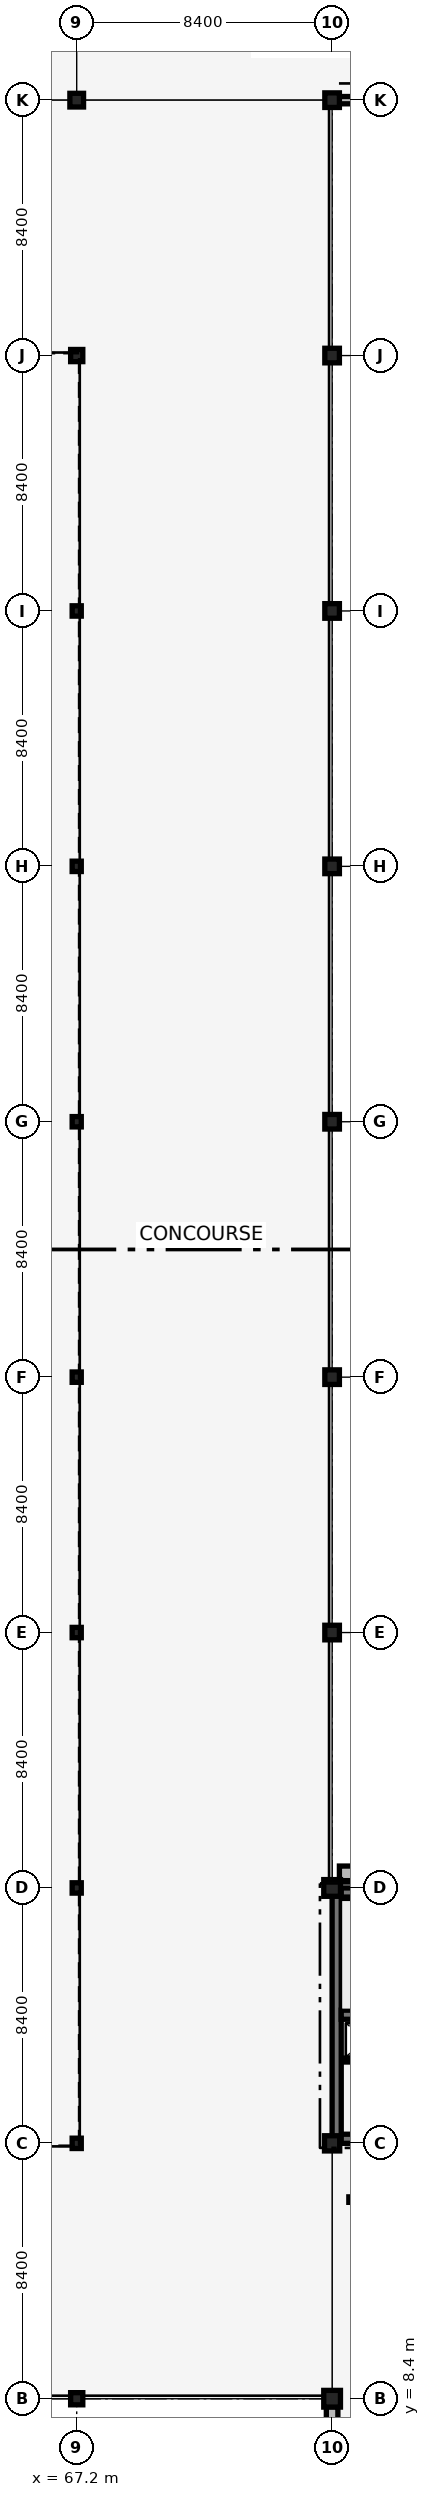
"""IFC4 building model, lengths in metres.
Left out: names, types, materials, properties, quantities, classifications, styles, units other than length and angle.
Written with IfcOpenShell. Run it as: python <this file> out.ifc"""

import sys

from ifc_helpers import new_model, si_unit, direction, frame, frame_2d, origin, origin_2d, place, context, subcontext, project, spatial, rectangle, i_section, extrude, element, save


model = new_model("IFC4")
c1 = context("Model", 3, precision=1e-05, world=origin(), true_north=direction((0.0, 1.0)))
c2 = subcontext(c1, "Body", "Model", "MODEL_VIEW")
j1 = project(units=[si_unit("LENGTHUNIT", "METRE"), si_unit("PLANEANGLEUNIT", "RADIAN")], contexts=[c1])
p1 = place(None, origin())
s1 = spatial("IfcSite", under=j1, at=p1, CompositionType="ELEMENT")
p2 = place(p1, origin())
s2 = spatial("IfcBuilding", under=s1, at=p2, CompositionType="ELEMENT")
p3 = place(p2, frame((0.0, 0.0, 5.44)))
s3 = spatial("IfcBuildingStorey", under=s2, at=p3, CompositionType="ELEMENT", Elevation=5.44)
p4 = place(p3, frame((75.75, 16.95, 0.0), z_axis=(0.0, 0.0, 1.0), x_axis=(1.0, 0.0, 0.0)))
e1 = element("IfcWall", 1, at=p4, inside=s3, PredefinedType="SHEAR", context=c2, shape_type="SweptSolid", body=[
    extrude(rectangle(XDim=8.1, YDim=0.3, at=frame_2d((4.05, 0.0))), origin(), (0.0, 0.0, 1.0), 4.12),
])
p5 = place(p4, frame((0.485, 0.0, 0.0)))
e2 = element("IfcOpeningElement", 2, at=p5, cuts=e1, PredefinedType="OPENING", context=c2, shape_type="SweptSolid", body=[
    extrude(rectangle(XDim=1.0, YDim=2.15, at=frame_2d((0.5, 1.075))), frame((0.0, 0.16, 0.0), z_axis=(0.0, -1.0, 0.0), x_axis=(1.0, 0.0, 0.0)), (0.0, 0.0, 1.0), 0.32),
])
for number, where, z_axis, x_axis in (
    (3, (75.75, 25.05, 0.0), (0.0, 0.0, 1.0), (1.0, 0.0, 0.0)),
    (4, (75.75, 16.95, 0.0), (0.0, 0.0, 1.0), (0.0, 1.0, 0.0)),
):
    element("IfcWall", number, at=place(p3, frame(where, z_axis=z_axis, x_axis=x_axis)), inside=s3, PredefinedType="SHEAR", context=c2, shape_type="SweptSolid", body=[
        extrude(rectangle(XDim=8.1, YDim=0.3, at=frame_2d((4.05, 0.0))), origin(), (0.0, 0.0, 1.0), 4.12),
    ])
p6 = place(p3, frame((75.9, 21.03, 0.0), z_axis=(0.0, 0.0, 1.0), x_axis=(1.0, 0.0, 0.0)))
e5 = element("IfcWall", 5, at=p6, inside=s3, PredefinedType="SHEAR", context=c2, shape_type="SweptSolid", body=[
    extrude(rectangle(XDim=7.8, YDim=0.3, at=frame_2d((3.9, 0.0))), origin(), (0.0, 0.0, 1.0), 4.12),
])
p7 = place(p6, frame((6.2, 0.0, 0.0)))
e6 = element("IfcOpeningElement", 6, at=p7, cuts=e5, PredefinedType="OPENING", context=c2, shape_type="SweptSolid", body=[
    extrude(rectangle(XDim=1.35, YDim=2.15, at=frame_2d((0.675, 1.075))), frame((0.0, 0.16, 0.0), z_axis=(0.0, -1.0, 0.0), x_axis=(1.0, 0.0, 0.0)), (0.0, 0.0, 1.0), 0.32),
])
p8 = place(p3, frame((67.2, 8.4, 0.0), z_axis=(0.0, 0.0, 1.0), x_axis=(1.0, 0.0, 0.0)))
e7 = element("IfcColumn", 7, at=p8, inside=s3, PredefinedType="COLUMN", context=c2, shape_type="SweptSolid", body=[
    extrude(rectangle(XDim=0.4, YDim=0.4, at=origin_2d()), origin(), (0.0, 0.0, 1.0), 4.12),
])
for number, where, z_axis, x_axis in (
    (8, (67.2, 16.8, 0.0), (0.0, 0.0, 1.0), (1.0, 0.0, 0.0)),
    (9, (67.2, 25.2, 0.0), (0.0, 0.0, 1.0), (1.0, 0.0, 0.0)),
    (10, (67.2, 33.6, 0.0), (0.0, 0.0, 1.0), (1.0, 0.0, 0.0)),
    (11, (67.2, 42.0, 0.0), (0.0, 0.0, 1.0), (1.0, 0.0, 0.0)),
    (12, (67.2, 50.4, 0.0), (0.0, 0.0, 1.0), (1.0, 0.0, 0.0)),
    (13, (67.2, 58.8, 0.0), (0.0, 0.0, 1.0), (1.0, 0.0, 0.0)),
    (14, (67.2, 67.2, 0.0), (0.0, 0.0, 1.0), (1.0, 0.0, 0.0)),
):
    element("IfcColumn", number, at=place(p3, frame(where, z_axis=z_axis, x_axis=x_axis)), inside=s3, PredefinedType="COLUMN", context=c2, shape_type="SweptSolid", body=[
        extrude(i_section(OverallWidth=0.3, OverallDepth=0.34, WebThickness=0.012, FlangeThickness=0.021, FilletRadius=0.027, at=origin_2d()), origin(), (0.0, 0.0, 1.0), 4.12),
    ])
p9 = place(p3, frame((67.2, 75.6, 0.0), z_axis=(0.0, 0.0, 1.0), x_axis=(1.0, 0.0, 0.0)))
e15 = element("IfcColumn", 15, at=p9, inside=s3, PredefinedType="COLUMN", context=c2, shape_type="SweptSolid", body=[
    extrude(rectangle(XDim=0.4, YDim=0.4, at=origin_2d()), origin(), (0.0, 0.0, 1.0), 4.12),
])
p10 = place(p3, frame((67.2, 84.0, 0.0), z_axis=(0.0, 0.0, 1.0), x_axis=(1.0, 0.0, 0.0)))
e16 = element("IfcColumn", 16, at=p10, inside=s3, PredefinedType="COLUMN", context=c2, shape_type="SweptSolid", body=[
    extrude(rectangle(XDim=0.45, YDim=0.45, at=origin_2d()), origin(), (0.0, 0.0, 1.0), 4.12),
])
p11 = place(p3, frame((75.6, 8.4, 0.0), z_axis=(0.0, 0.0, 1.0), x_axis=(1.0, 0.0, 0.0)))
e17 = element("IfcColumn", 17, at=p11, inside=s3, PredefinedType="COLUMN", context=c2, shape_type="SweptSolid", body=[
    extrude(rectangle(XDim=0.55, YDim=0.55, at=origin_2d()), origin(), (0.0, 0.0, 1.0), 4.12),
])
p12 = place(p3, frame((75.6, 16.8, 0.0), z_axis=(0.0, 0.0, 1.0), x_axis=(1.0, 0.0, 0.0)))
e18 = element("IfcColumn", 18, at=p12, inside=s3, PredefinedType="COLUMN", context=c2, shape_type="SweptSolid", body=[
    extrude(rectangle(XDim=0.5, YDim=0.5, at=origin_2d()), origin(), (0.0, 0.0, 1.0), 4.12),
])
p13 = place(p3, frame((75.6, 25.2, 0.0), z_axis=(0.0, 0.0, 1.0), x_axis=(1.0, 0.0, 0.0)))
e19 = element("IfcColumn", 19, at=p13, inside=s3, PredefinedType="COLUMN", context=c2, shape_type="SweptSolid", body=[
    extrude(rectangle(XDim=0.55, YDim=0.55, at=origin_2d()), origin(), (0.0, 0.0, 1.0), 4.12),
])
for number, where, z_axis, x_axis in (
    (20, (75.6, 33.6, 0.0), (0.0, 0.0, 1.0), (1.0, 0.0, 0.0)),
    (21, (75.6, 42.0, 0.0), (0.0, 0.0, 1.0), (1.0, 0.0, 0.0)),
    (22, (75.6, 50.4, 0.0), (0.0, 0.0, 1.0), (1.0, 0.0, 0.0)),
    (23, (75.6, 58.8, 0.0), (0.0, 0.0, 1.0), (1.0, 0.0, 0.0)),
    (24, (75.6, 67.2, 0.0), (0.0, 0.0, 1.0), (1.0, 0.0, 0.0)),
    (25, (75.6, 75.6, 0.0), (0.0, 0.0, 1.0), (1.0, 0.0, 0.0)),
    (26, (75.6, 84.0, 0.0), (0.0, 0.0, 1.0), (1.0, 0.0, 0.0)),
):
    element("IfcColumn", number, at=place(p3, frame(where, z_axis=z_axis, x_axis=x_axis)), inside=s3, PredefinedType="COLUMN", context=c2, shape_type="SweptSolid", body=[
        extrude(rectangle(XDim=0.48, YDim=0.48, at=origin_2d()), origin(), (0.0, 0.0, 1.0), 4.12),
    ])
p14 = place(p3, frame((75.6, 0.235, 0.0), z_axis=(0.0, 0.0, 1.0), x_axis=(0.0, 1.0, 0.0)))
e27 = element("IfcWall", 27, at=p14, inside=s3, PredefinedType="SOLIDWALL", context=c2, shape_type="SweptSolid", body=[
    extrude(rectangle(XDim=7.905, YDim=0.38, at=frame_2d((3.952, 0.0))), origin(), (0.0, 0.0, 1.0), 3.81),
])
p15 = place(p14, frame((1.162, 0.0, 0.75)))
e28 = element("IfcOpeningElement", 28, at=p15, cuts=e27, PredefinedType="OPENING", context=c2, shape_type="SweptSolid", body=[
    extrude(rectangle(XDim=0.68, YDim=2.3, at=frame_2d((0.34, 1.15))), frame((0.0, 0.2, 0.0), z_axis=(0.0, -1.0, 0.0), x_axis=(1.0, 0.0, 0.0)), (0.0, 0.0, 1.0), 0.4),
])
p16 = place(p14, frame((2.743, 0.0, 0.75)))
e29 = element("IfcOpeningElement", 29, at=p16, cuts=e27, PredefinedType="OPENING", context=c2, shape_type="SweptSolid", body=[
    extrude(rectangle(XDim=0.68, YDim=2.3, at=frame_2d((0.34, 1.15))), frame((0.0, 0.2, 0.0), z_axis=(0.0, -1.0, 0.0), x_axis=(1.0, 0.0, 0.0)), (0.0, 0.0, 1.0), 0.4),
])
p17 = place(p14, frame((4.482, 0.0, 0.75)))
e30 = element("IfcOpeningElement", 30, at=p17, cuts=e27, PredefinedType="OPENING", context=c2, shape_type="SweptSolid", body=[
    extrude(rectangle(XDim=0.68, YDim=2.3, at=frame_2d((0.34, 1.15))), frame((0.0, 0.2, 0.0), z_axis=(0.0, -1.0, 0.0), x_axis=(1.0, 0.0, 0.0)), (0.0, 0.0, 1.0), 0.4),
])
p18 = place(p14, frame((6.063, 0.0, 0.75)))
e31 = element("IfcOpeningElement", 31, at=p18, cuts=e27, PredefinedType="OPENING", context=c2, shape_type="SweptSolid", body=[
    extrude(rectangle(XDim=0.68, YDim=2.3, at=frame_2d((0.34, 1.15))), frame((0.0, 0.2, 0.0), z_axis=(0.0, -1.0, 0.0), x_axis=(1.0, 0.0, 0.0)), (0.0, 0.0, 1.0), 0.4),
])
p19 = place(p3, frame((75.84, 25.68, 0.0), z_axis=(0.0, 0.0, 1.0), x_axis=(1.0, 0.0, 0.0)))
e32 = element("IfcWall", 32, at=p19, inside=s3, PredefinedType="SOLIDWALL", context=c2, shape_type="SweptSolid", body=[
    extrude(rectangle(XDim=7.92, YDim=0.48, at=frame_2d((3.96, 0.0))), origin(), (0.0, 0.0, 1.0), 4.42),
])
p20 = place(p3, frame((75.825, 84.0, 0.0), z_axis=(0.0, 0.0, 1.0), x_axis=(1.0, 0.0, 0.0)))
e33 = element("IfcWall", 33, at=p20, inside=s3, PredefinedType="SOLIDWALL", context=c2, shape_type="SweptSolid", body=[
    extrude(rectangle(XDim=7.965, YDim=0.24, at=frame_2d((3.982, 0.0))), origin(), (0.0, 0.0, 1.0), 3.38),
])
p21 = place(p20, frame((0.816, 0.0, 0.35)))
e34 = element("IfcOpeningElement", 34, at=p21, cuts=e33, PredefinedType="OPENING", context=c2, shape_type="SweptSolid", body=[
    extrude(rectangle(XDim=0.44, YDim=1.25, at=frame_2d((0.22, 0.625))), frame((0.0, 0.13, 0.0), z_axis=(0.0, -1.0, 0.0), x_axis=(1.0, 0.0, 0.0)), (0.0, 0.0, 1.0), 0.26),
])
p22 = place(p20, frame((2.29, 0.0, 0.35)))
e35 = element("IfcOpeningElement", 35, at=p22, cuts=e33, PredefinedType="OPENING", context=c2, shape_type="SweptSolid", body=[
    extrude(rectangle(XDim=0.44, YDim=1.25, at=frame_2d((0.22, 0.625))), frame((0.0, 0.13, 0.0), z_axis=(0.0, -1.0, 0.0), x_axis=(1.0, 0.0, 0.0)), (0.0, 0.0, 1.0), 0.26),
])
p23 = place(p20, frame((3.762, 0.0, 0.35)))
e36 = element("IfcOpeningElement", 36, at=p23, cuts=e33, PredefinedType="OPENING", context=c2, shape_type="SweptSolid", body=[
    extrude(rectangle(XDim=0.44, YDim=1.25, at=frame_2d((0.22, 0.625))), frame((0.0, 0.13, 0.0), z_axis=(0.0, -1.0, 0.0), x_axis=(1.0, 0.0, 0.0)), (0.0, 0.0, 1.0), 0.26),
])
p24 = place(p20, frame((5.236, 0.0, 0.35)))
e37 = element("IfcOpeningElement", 37, at=p24, cuts=e33, PredefinedType="OPENING", context=c2, shape_type="SweptSolid", body=[
    extrude(rectangle(XDim=0.44, YDim=1.25, at=frame_2d((0.22, 0.625))), frame((0.0, 0.13, 0.0), z_axis=(0.0, -1.0, 0.0), x_axis=(1.0, 0.0, 0.0)), (0.0, 0.0, 1.0), 0.26),
])
p25 = place(p20, frame((6.708, 0.0, 0.35)))
e38 = element("IfcOpeningElement", 38, at=p25, cuts=e33, PredefinedType="OPENING", context=c2, shape_type="SweptSolid", body=[
    extrude(rectangle(XDim=0.44, YDim=1.25, at=frame_2d((0.22, 0.625))), frame((0.0, 0.13, 0.0), z_axis=(0.0, -1.0, 0.0), x_axis=(1.0, 0.0, 0.0)), (0.0, 0.0, 1.0), 0.26),
])
p26 = place(p20, frame((0.816, 0.0, 1.8)))
e39 = element("IfcOpeningElement", 39, at=p26, cuts=e33, PredefinedType="OPENING", context=c2, shape_type="SweptSolid", body=[
    extrude(rectangle(XDim=0.44, YDim=1.25, at=frame_2d((0.22, 0.625))), frame((0.0, 0.13, 0.0), z_axis=(0.0, -1.0, 0.0), x_axis=(1.0, 0.0, 0.0)), (0.0, 0.0, 1.0), 0.26),
])
p27 = place(p20, frame((2.29, 0.0, 1.8)))
e40 = element("IfcOpeningElement", 40, at=p27, cuts=e33, PredefinedType="OPENING", context=c2, shape_type="SweptSolid", body=[
    extrude(rectangle(XDim=0.44, YDim=1.25, at=frame_2d((0.22, 0.625))), frame((0.0, 0.13, 0.0), z_axis=(0.0, -1.0, 0.0), x_axis=(1.0, 0.0, 0.0)), (0.0, 0.0, 1.0), 0.26),
])
p28 = place(p20, frame((3.762, 0.0, 1.8)))
e41 = element("IfcOpeningElement", 41, at=p28, cuts=e33, PredefinedType="OPENING", context=c2, shape_type="SweptSolid", body=[
    extrude(rectangle(XDim=0.44, YDim=1.25, at=frame_2d((0.22, 0.625))), frame((0.0, 0.13, 0.0), z_axis=(0.0, -1.0, 0.0), x_axis=(1.0, 0.0, 0.0)), (0.0, 0.0, 1.0), 0.26),
])
p29 = place(p20, frame((5.236, 0.0, 1.8)))
e42 = element("IfcOpeningElement", 42, at=p29, cuts=e33, PredefinedType="OPENING", context=c2, shape_type="SweptSolid", body=[
    extrude(rectangle(XDim=0.44, YDim=1.25, at=frame_2d((0.22, 0.625))), frame((0.0, 0.13, 0.0), z_axis=(0.0, -1.0, 0.0), x_axis=(1.0, 0.0, 0.0)), (0.0, 0.0, 1.0), 0.26),
])
p30 = place(p20, frame((6.708, 0.0, 1.8)))
e43 = element("IfcOpeningElement", 43, at=p30, cuts=e33, PredefinedType="OPENING", context=c2, shape_type="SweptSolid", body=[
    extrude(rectangle(XDim=0.44, YDim=1.25, at=frame_2d((0.22, 0.625))), frame((0.0, 0.13, 0.0), z_axis=(0.0, -1.0, 0.0), x_axis=(1.0, 0.0, 0.0)), (0.0, 0.0, 1.0), 0.26),
])
p31 = place(p3, frame((75.92, 19.54, 0.0), z_axis=(0.0, 0.0, 1.0), x_axis=(1.0, 0.0, 0.0)))
e44 = element("IfcWall", 44, at=p31, inside=s3, PredefinedType="PARTITIONING", context=c2, shape_type="SweptSolid", body=[
    extrude(rectangle(XDim=1.62, YDim=0.13, at=frame_2d((0.81, 0.0))), origin(), (0.0, 0.0, 1.0), 4.12),
])
p32 = place(p3, frame((76.15, 14.95, 0.0), z_axis=(0.0, 0.0, 1.0), x_axis=(1.0, 0.0, 0.0)))
e45 = element("IfcWall", 45, at=p32, inside=s3, PredefinedType="PARTITIONING", context=c2, shape_type="SweptSolid", body=[
    extrude(rectangle(XDim=7.5, YDim=0.18, at=frame_2d((3.75, 0.0))), origin(), (0.0, 0.0, 1.0), 4.12),
])
p33 = place(p32, frame((2.875, 0.0, 0.0)))
e46 = element("IfcOpeningElement", 46, at=p33, cuts=e45, PredefinedType="OPENING", context=c2, shape_type="SweptSolid", body=[
    extrude(rectangle(XDim=1.75, YDim=2.3, at=frame_2d((0.875, 1.15))), frame((0.0, 0.1, 0.0), z_axis=(0.0, -1.0, 0.0), x_axis=(1.0, 0.0, 0.0)), (0.0, 0.0, 1.0), 0.2),
])
save(model, sys.argv[1])
